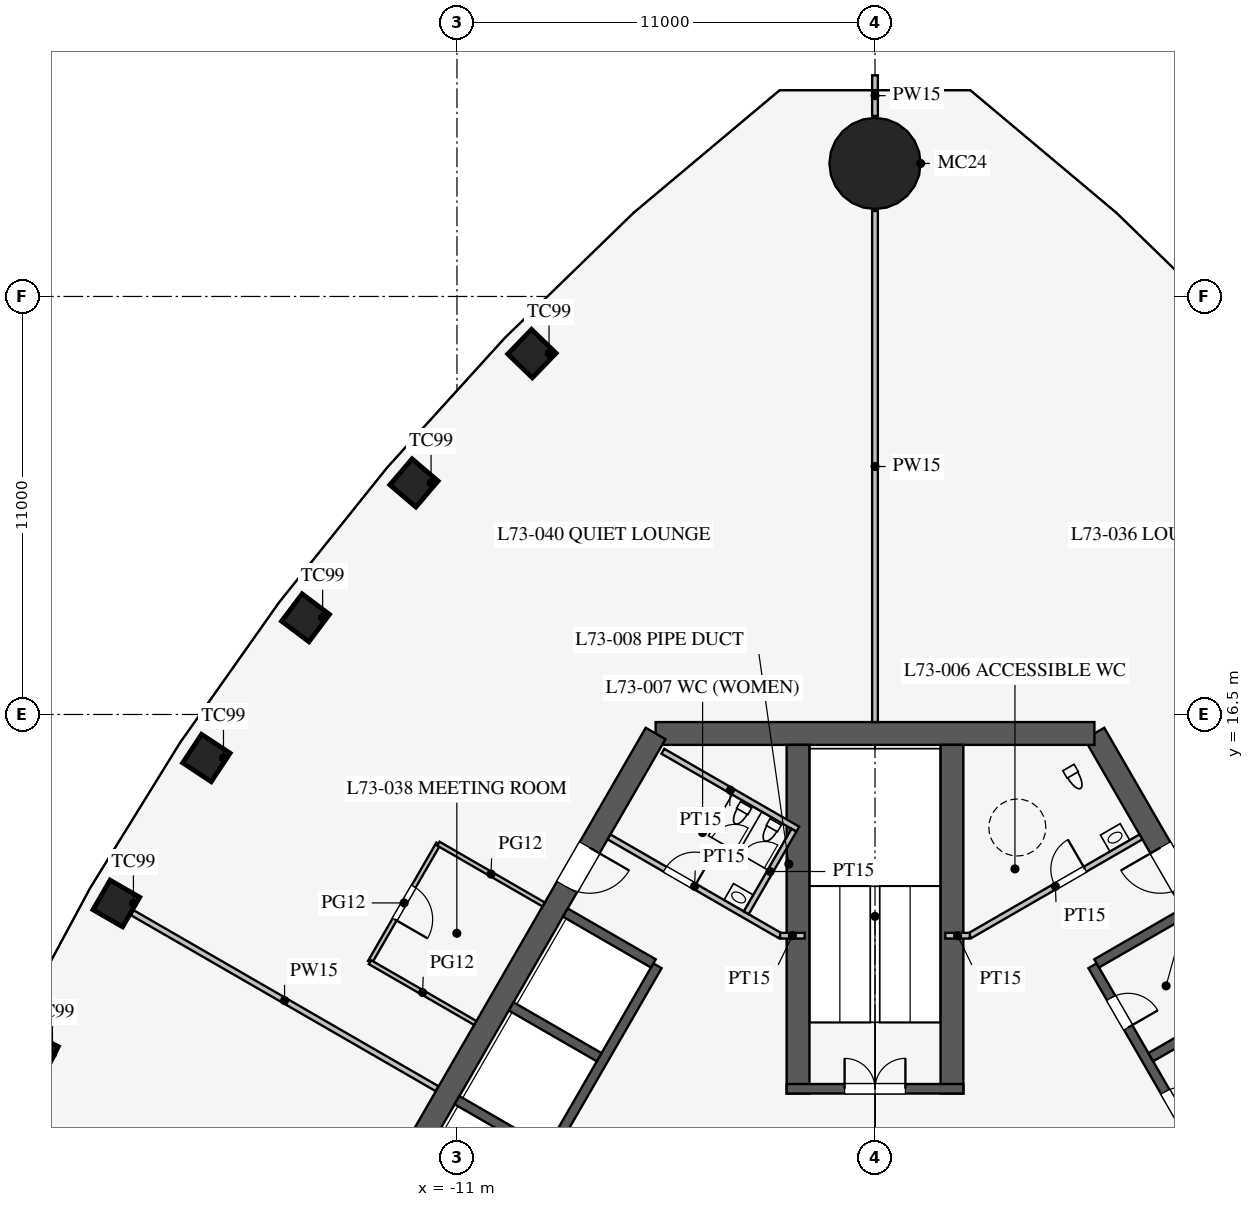
"""IFC4 building model, lengths in metres.
Left out: names, types, materials, properties, quantities, classifications, styles, units other than length and angle.
Written with IfcOpenShell. Run it as: python <this file> out.ifc"""

import sys

from ifc_helpers import new_model, si_unit, direction, frame, frame_2d, origin, origin_2d, place, context, subcontext, project, spatial, rectangle, circle, extrude, element, fill, save


model = new_model("IFC4")
c1 = context("Model", 3, precision=1e-05, world=origin(), true_north=direction((0.0, 1.0)))
c2 = subcontext(c1, "Body", "Model", "MODEL_VIEW")
j1 = project(units=[si_unit("LENGTHUNIT", "METRE"), si_unit("PLANEANGLEUNIT", "RADIAN")], contexts=[c1])
p1 = place(None, origin())
s1 = spatial("IfcSite", under=j1, at=p1, CompositionType="ELEMENT")
p2 = place(p1, origin())
s2 = spatial("IfcBuilding", under=s1, at=p2, CompositionType="ELEMENT")
p3 = place(p2, frame((0.0, 0.0, 318.3)))
s3 = spatial("IfcBuildingStorey", under=s2, at=p3, CompositionType="ELEMENT", Elevation=318.3)
for number, where, z_axis, x_axis in (
    (1, (-9.027, 25.997, 0.0), (0.0, 0.0, 1.0), (-0.695, -0.719, 0.0)),
    (2, (-12.132, 22.593, 0.0), (0.0, 0.0, 1.0), (-0.649, -0.761, 0.0)),
    (3, (-14.985, 19.044, 0.0), (0.0, 0.0, 1.0), (-0.601, -0.799, 0.0)),
    (4, (-17.594, 15.354, 0.0), (0.0, 0.0, 1.0), (-0.552, -0.834, 0.0)),
    (5, (-19.963, 11.526, 0.0), (0.0, 0.0, 1.0), (-0.5, -0.866, 0.0)),
    (6, (-22.094, 7.56, 0.0), (0.0, 0.0, 1.0), (-0.447, -0.895, 0.0)),
):
    element("IfcColumn", number, at=place(p3, frame(where, z_axis=z_axis, x_axis=x_axis)), inside=s3, PredefinedType="COLUMN", context=c2, shape_type="SweptSolid", body=[
        extrude(rectangle(XDim=0.9, YDim=0.9, at=origin_2d()), origin(), (0.0, 0.0, 1.0), 4.2),
    ])
p4 = place(p3, frame((0.0, 31.0, 0.0), z_axis=(0.0, 0.0, 1.0), x_axis=(1.0, 0.0, 0.0)))
e7 = element("IfcColumn", 7, at=p4, inside=s3, PredefinedType="COLUMN", context=c2, shape_type="SweptSolid", body=[
    extrude(circle(Radius=1.2, at=origin_2d()), origin(), (0.0, 0.0, 1.0), 4.2),
])
p5 = place(p3, frame((16.743, -3.0, 0.0), z_axis=(0.0, 0.0, 1.0), x_axis=(-0.500002442456, 0.866023993627, 0.0)))
e8 = element("IfcWall", 8, at=p5, inside=s3, PredefinedType="SHEAR", context=c2, shape_type="SweptSolid", body=[
    extrude(rectangle(XDim=21.939, YDim=0.6, at=frame_2d((10.97, 0.0))), origin(), (0.0, 0.0, 1.0), 4.2),
])
p6 = place(p5, frame((17.27, 0.0, 0.0)))
e9 = element("IfcOpeningElement", 9, at=p6, cuts=e8, PredefinedType="OPENING", context=c2, shape_type="SweptSolid", body=[
    extrude(rectangle(XDim=1.2, YDim=2.1, at=frame_2d((0.6, 1.05))), frame((0.0, 0.31, 0.0), z_axis=(0.0, -1.0, 0.0), x_axis=(1.0, 0.0, 0.0)), (0.0, 0.0, 1.0), 0.62),
])
p7 = place(p5, frame((3.47, 0.0, 0.0)))
e10 = element("IfcOpeningElement", 10, at=p7, cuts=e8, PredefinedType="OPENING", context=c2, shape_type="SweptSolid", body=[
    extrude(rectangle(XDim=1.2, YDim=2.1, at=frame_2d((0.6, 1.05))), frame((0.0, 0.31, 0.0), z_axis=(0.0, -1.0, 0.0), x_axis=(1.0, 0.0, 0.0)), (0.0, 0.0, 1.0), 0.62),
])
p8 = place(p3, frame((5.773, 16.0, 0.0), z_axis=(0.0, 0.0, 1.0), x_axis=(-1.0, 0.0, 0.0)))
e11 = element("IfcWall", 11, at=p8, inside=s3, PredefinedType="SHEAR", context=c2, shape_type="SweptSolid", body=[
    extrude(rectangle(XDim=11.547, YDim=0.6, at=frame_2d((5.773, 0.0))), origin(), (0.0, 0.0, 1.0), 4.2),
])
p9 = place(p3, frame((-5.773, 16.0, 0.0), z_axis=(0.0, 0.0, 1.0), x_axis=(-0.500002442456, -0.866023993627, 0.0)))
e12 = element("IfcWall", 12, at=p9, inside=s3, PredefinedType="SHEAR", context=c2, shape_type="SweptSolid", body=[
    extrude(rectangle(XDim=21.939, YDim=0.6, at=frame_2d((10.97, 0.0))), origin(), (0.0, 0.0, 1.0), 4.2),
])
p10 = place(p9, frame((17.27, 0.0, 0.0)))
e13 = element("IfcOpeningElement", 13, at=p10, cuts=e12, PredefinedType="OPENING", context=c2, shape_type="SweptSolid", body=[
    extrude(rectangle(XDim=1.2, YDim=2.1, at=frame_2d((0.6, 1.05))), frame((0.0, 0.31, 0.0), z_axis=(0.0, -1.0, 0.0), x_axis=(1.0, 0.0, 0.0)), (0.0, 0.0, 1.0), 0.62),
])
p11 = place(p9, frame((3.47, 0.0, 0.0)))
e14 = element("IfcOpeningElement", 14, at=p11, cuts=e12, PredefinedType="OPENING", context=c2, shape_type="SweptSolid", body=[
    extrude(rectangle(XDim=1.2, YDim=2.1, at=frame_2d((0.6, 1.05))), frame((0.0, 0.31, 0.0), z_axis=(0.0, -1.0, 0.0), x_axis=(1.0, 0.0, 0.0)), (0.0, 0.0, 1.0), 0.62),
])
p12 = place(p3, frame((11.424, 0.014, 0.0), z_axis=(0.0, 0.0, 1.0), x_axis=(-0.500001763848, 0.866024385424, 0.0)))
e15 = element("IfcWall", 15, at=p12, inside=s3, PredefinedType="SHEAR", context=c2, shape_type="SweptSolid", body=[
    extrude(rectangle(XDim=11.4, YDim=0.25, at=frame_2d((5.7, 0.0))), origin(), (0.0, 0.0, 1.0), 4.2),
])
p13 = place(p12, frame((0.975, 0.0, 0.0)))
e16 = element("IfcOpeningElement", 16, at=p13, cuts=e15, PredefinedType="OPENING", context=c2, shape_type="SweptSolid", body=[
    extrude(rectangle(XDim=0.9, YDim=2.1, at=frame_2d((0.45, 1.05))), frame((0.0, 0.135, 0.0), z_axis=(0.0, -1.0, 0.0), x_axis=(1.0, 0.0, 0.0)), (0.0, 0.0, 1.0), 0.27),
])
p14 = place(p12, frame((3.825, 0.0, 0.0)))
e17 = element("IfcOpeningElement", 17, at=p14, cuts=e15, PredefinedType="OPENING", context=c2, shape_type="SweptSolid", body=[
    extrude(rectangle(XDim=0.9, YDim=2.1, at=frame_2d((0.45, 1.05))), frame((0.0, 0.135, 0.0), z_axis=(0.0, -1.0, 0.0), x_axis=(1.0, 0.0, 0.0)), (0.0, 0.0, 1.0), 0.27),
])
p15 = place(p12, frame((6.675, 0.0, 0.0)))
e18 = element("IfcOpeningElement", 18, at=p15, cuts=e15, PredefinedType="OPENING", context=c2, shape_type="SweptSolid", body=[
    extrude(rectangle(XDim=0.9, YDim=2.1, at=frame_2d((0.45, 1.05))), frame((0.0, 0.135, 0.0), z_axis=(0.0, -1.0, 0.0), x_axis=(1.0, 0.0, 0.0)), (0.0, 0.0, 1.0), 0.27),
])
p16 = place(p12, frame((9.525, 0.0, 0.0)))
e19 = element("IfcOpeningElement", 19, at=p16, cuts=e15, PredefinedType="OPENING", context=c2, shape_type="SweptSolid", body=[
    extrude(rectangle(XDim=0.9, YDim=2.1, at=frame_2d((0.45, 1.05))), frame((0.0, 0.135, 0.0), z_axis=(0.0, -1.0, 0.0), x_axis=(1.0, 0.0, 0.0)), (0.0, 0.0, 1.0), 0.27),
])
for number, where, z_axis, x_axis in (
    (20, (7.257, 7.481, 0.0), (0.0, 0.0, 1.0), (0.866, 0.5, 0.0)),
    (21, (5.832, 9.949, 0.0), (0.0, 0.0, 1.0), (0.866, 0.5, 0.0)),
):
    element("IfcWall", number, at=place(p3, frame(where, z_axis=z_axis, x_axis=x_axis)), inside=s3, PredefinedType="SHEAR", context=c2, shape_type="SweptSolid", body=[
        extrude(rectangle(XDim=2.675, YDim=0.25, at=frame_2d((1.337, 0.0))), origin(), (0.0, 0.0, 1.0), 4.2),
    ])
p17 = place(p3, frame((-5.724, 9.886, 0.0), z_axis=(0.0, 0.0, 1.0), x_axis=(-0.500001763848, -0.866024385424, 0.0)))
e22 = element("IfcWall", 22, at=p17, inside=s3, PredefinedType="SHEAR", context=c2, shape_type="SweptSolid", body=[
    extrude(rectangle(XDim=11.4, YDim=0.25, at=frame_2d((5.7, 0.0))), origin(), (0.0, 0.0, 1.0), 4.2),
])
p18 = place(p17, frame((6.525, 0.0, 0.0)))
e23 = element("IfcOpeningElement", 23, at=p18, cuts=e22, PredefinedType="OPENING", context=c2, shape_type="SweptSolid", body=[
    extrude(rectangle(XDim=1.2, YDim=2.2, at=frame_2d((0.6, 1.1))), frame((0.0, 0.135, 0.0), z_axis=(0.0, -1.0, 0.0), x_axis=(1.0, 0.0, 0.0)), (0.0, 0.0, 1.0), 0.27),
])
p19 = place(p17, frame((9.375, 0.0, 0.0)))
e24 = element("IfcOpeningElement", 24, at=p19, cuts=e22, PredefinedType="OPENING", context=c2, shape_type="SweptSolid", body=[
    extrude(rectangle(XDim=1.2, YDim=2.2, at=frame_2d((0.6, 1.1))), frame((0.0, 0.135, 0.0), z_axis=(0.0, -1.0, 0.0), x_axis=(1.0, 0.0, 0.0)), (0.0, 0.0, 1.0), 0.27),
])
for number, where, z_axis, x_axis in (
    (25, (-5.832, 9.949, 0.0), (0.0, 0.0, 1.0), (-0.866, 0.5, 0.0)),
    (26, (-7.257, 7.481, 0.0), (0.0, 0.0, 1.0), (-0.866, 0.5, 0.0)),
    (27, (-8.682, 5.012, 0.0), (0.0, 0.0, 1.0), (-0.866, 0.5, 0.0)),
):
    element("IfcWall", number, at=place(p3, frame(where, z_axis=z_axis, x_axis=x_axis)), inside=s3, PredefinedType="SHEAR", context=c2, shape_type="SweptSolid", body=[
        extrude(rectangle(XDim=2.675, YDim=0.25, at=frame_2d((1.337, 0.0))), origin(), (0.0, 0.0, 1.0), 4.2),
    ])
for number, where, z_axis, x_axis in (
    (28, (2.025, 6.525, 0.0), (0.0, 0.0, 1.0), (0.0, 1.0, 0.0)),
    (29, (-2.025, 6.525, 0.0), (0.0, 0.0, 1.0), (0.0, 1.0, 0.0)),
):
    element("IfcWall", number, at=place(p3, frame(where, z_axis=z_axis, x_axis=x_axis)), inside=s3, PredefinedType="SHEAR", context=c2, shape_type="SweptSolid", body=[
        extrude(rectangle(XDim=9.175, YDim=0.6, at=frame_2d((4.587, 0.0))), origin(), (0.0, 0.0, 1.0), 4.2),
    ])
p20 = place(p3, frame((2.325, 6.65, 0.0), z_axis=(0.0, 0.0, 1.0), x_axis=(-1.0, 0.0, 0.0)))
e30 = element("IfcWall", 30, at=p20, inside=s3, PredefinedType="SHEAR", context=c2, shape_type="SweptSolid", body=[
    extrude(rectangle(XDim=4.65, YDim=0.25, at=frame_2d((2.325, 0.0))), origin(), (0.0, 0.0, 1.0), 4.2),
])
p21 = place(p20, frame((1.525, 0.0, 0.0)))
e31 = element("IfcOpeningElement", 31, at=p21, cuts=e30, PredefinedType="OPENING", context=c2, shape_type="SweptSolid", body=[
    extrude(rectangle(XDim=1.6, YDim=2.1, at=frame_2d((0.8, 1.05))), frame((0.0, 0.135, 0.0), z_axis=(0.0, -1.0, 0.0), x_axis=(1.0, 0.0, 0.0)), (0.0, 0.0, 1.0), 0.27),
])
p22 = place(p3, frame((2.495, 10.678, 0.0), z_axis=(0.0, 0.0, 1.0), x_axis=(0.866021400173, 0.500006934395, 0.0)))
e32 = element("IfcWall", 32, at=p22, inside=s3, PredefinedType="PARTITIONING", context=c2, shape_type="SweptSolid", body=[
    extrude(rectangle(XDim=5.2, YDim=0.15, at=frame_2d((2.6, 0.0))), origin(), (0.0, 0.0, 1.0), 4.0),
])
p23 = place(p22, frame((2.6, 0.0, 0.0)))
e33 = element("IfcOpeningElement", 33, at=p23, cuts=e32, PredefinedType="OPENING", context=c2, shape_type="SweptSolid", body=[
    extrude(rectangle(XDim=0.9, YDim=2.1, at=frame_2d((0.45, 1.05))), frame((0.0, 0.085, 0.0), z_axis=(0.0, -1.0, 0.0), x_axis=(1.0, 0.0, 0.0)), (0.0, 0.0, 1.0), 0.17),
])
p24 = place(p3, frame((-2.495, 10.678, 0.0), z_axis=(0.0, 0.0, 1.0), x_axis=(-0.866021400173, 0.500006934395, 0.0)))
e34 = element("IfcWall", 34, at=p24, inside=s3, PredefinedType="PARTITIONING", context=c2, shape_type="SweptSolid", body=[
    extrude(rectangle(XDim=5.2, YDim=0.15, at=frame_2d((2.6, 0.0))), origin(), (0.0, 0.0, 1.0), 4.0),
])
p25 = place(p24, frame((2.6, 0.0, 0.0)))
e35 = element("IfcOpeningElement", 35, at=p25, cuts=e34, PredefinedType="OPENING", context=c2, shape_type="SweptSolid", body=[
    extrude(rectangle(XDim=0.9, YDim=2.1, at=frame_2d((0.45, 1.05))), frame((0.0, 0.085, 0.0), z_axis=(0.0, -1.0, 0.0), x_axis=(1.0, 0.0, 0.0)), (0.0, 0.0, 1.0), 0.17),
])
for number, where, z_axis, x_axis in (
    (36, (2.495, 10.678, 0.0), (0.0, 0.0, 1.0), (-1.0, 0.0, 0.0)),
    (37, (-2.495, 10.678, 0.0), (0.0, 0.0, 1.0), (1.0, 0.0, 0.0)),
):
    element("IfcWall", number, at=place(p3, frame(where, z_axis=z_axis, x_axis=x_axis)), inside=s3, PredefinedType="PARTITIONING", context=c2, shape_type="SweptSolid", body=[
        extrude(rectangle(XDim=0.645, YDim=0.15, at=frame_2d((0.323, 0.0))), origin(), (0.0, 0.0, 1.0), 4.0),
    ])
p26 = place(p3, frame((-2.031, 13.482, 0.0), z_axis=(0.0, 0.0, 1.0), x_axis=(-0.866050731258, 0.499956128963, 0.0)))
e38 = element("IfcWall", 38, at=p26, inside=s3, PredefinedType="PARTITIONING", context=c2, shape_type="SweptSolid", body=[
    extrude(rectangle(XDim=4.1, YDim=0.15, at=frame_2d((2.05, 0.0))), origin(), (0.0, 0.0, 1.0), 4.0),
])
p27 = place(p3, frame((-3.389, 11.281, 0.0), z_axis=(0.0, 0.0, 1.0), x_axis=(0.499989096993, 0.866031698547, 0.0)))
e39 = element("IfcWall", 39, at=p27, inside=s3, PredefinedType="PARTITIONING", context=c2, shape_type="SweptSolid", body=[
    extrude(rectangle(XDim=2.51, YDim=0.15, at=frame_2d((1.255, 0.0))), origin(), (0.0, 0.0, 1.0), 4.0),
])
p28 = place(p3, frame((0.0, 16.3, 0.0), z_axis=(0.0, 0.0, 1.0), x_axis=(0.0, 1.0, 0.0)))
e40 = element("IfcWall", 40, at=p28, inside=s3, PredefinedType="PARTITIONING", context=c2, shape_type="SweptSolid", body=[
    extrude(rectangle(XDim=13.45, YDim=0.15, at=frame_2d((6.725, 0.0))), origin(), (0.0, 0.0, 1.0), 2.0),
])
p29 = place(p3, frame((0.0, 32.25, 0.0), z_axis=(0.0, 0.0, 1.0), x_axis=(0.0, 1.0, 0.0)))
e41 = element("IfcWall", 41, at=p29, inside=s3, PredefinedType="PARTITIONING", context=c2, shape_type="SweptSolid", body=[
    extrude(rectangle(XDim=1.07, YDim=0.15, at=frame_2d((0.535, 0.0))), origin(), (0.0, 0.0, 1.0), 2.0),
])
p30 = place(p3, frame((-11.527, 6.655, 0.0), z_axis=(0.0, 0.0, 1.0), x_axis=(-0.866021846952, 0.500006160563, 0.0)))
e42 = element("IfcWall", 42, at=p30, inside=s3, PredefinedType="PARTITIONING", context=c2, shape_type="SweptSolid", body=[
    extrude(rectangle(XDim=9.262, YDim=0.15, at=frame_2d((4.631, 0.0))), origin(), (0.0, 0.0, 1.0), 3.3),
])
p31 = place(p3, frame((-11.49, 13.1, 0.0), z_axis=(0.0, 0.0, 1.0), x_axis=(-0.499931829785, -0.866064758299, 0.0)))
e43 = element("IfcWall", 43, at=p31, inside=s3, PredefinedType="PARTITIONING", context=c2, shape_type="SweptSolid", body=[
    extrude(rectangle(XDim=3.6, YDim=0.12, at=frame_2d((1.8, 0.0))), origin(), (0.0, 0.0, 1.0), 2.9),
])
p32 = place(p31, frame((1.3, 0.0, 0.15)))
e44 = element("IfcOpeningElement", 44, at=p32, cuts=e43, PredefinedType="OPENING", context=c2, shape_type="SweptSolid", body=[
    extrude(rectangle(XDim=1.0, YDim=2.1, at=frame_2d((0.5, 1.05))), frame((0.0, 0.07, 0.0), z_axis=(0.0, -1.0, 0.0), x_axis=(1.0, 0.0, 0.0)), (0.0, 0.0, 1.0), 0.14),
])
p33 = place(p3, frame((-10.518, 8.382, 0.0), z_axis=(0.0, 0.0, 1.0), x_axis=(-0.866042017984, 0.499971222258, 0.0)))
e45 = element("IfcWall", 45, at=p33, inside=s3, PredefinedType="PARTITIONING", context=c2, shape_type="SweptSolid", body=[
    extrude(rectangle(XDim=3.2, YDim=0.12, at=frame_2d((1.6, 0.0))), origin(), (0.0, 0.0, 1.0), 2.9),
])
p34 = place(p3, frame((-8.718, 11.5, 0.0), z_axis=(0.0, 0.0, 1.0), x_axis=(-0.866028054938, 0.499995408039, 0.0)))
e46 = element("IfcWall", 46, at=p34, inside=s3, PredefinedType="PARTITIONING", context=c2, shape_type="SweptSolid", body=[
    extrude(rectangle(XDim=3.2, YDim=0.12, at=frame_2d((1.6, 0.0))), origin(), (0.0, 0.0, 1.0), 2.9),
])
p35 = place(p23, origin())
e47 = element("IfcDoor", 47, at=p35, inside=s3, OperationType="SINGLE_SWING_RIGHT", PredefinedType="DOOR", context=c2, shape_type="SweptSolid", body=[
    extrude(rectangle(XDim=0.9, YDim=2.1, at=frame_2d((0.45, 1.05))), frame((0.0, 0.025, 0.0), z_axis=(0.0, -1.0, 0.0), x_axis=(1.0, 0.0, 0.0)), (0.0, 0.0, 1.0), 0.05),
])
fill(e33, e47)
p36 = place(p25, frame((0.9, 0.0, 0.0), z_axis=(0.0, 0.0, 1.0), x_axis=(-1.0, 0.0, 0.0)))
e48 = element("IfcDoor", 48, at=p36, inside=s3, OperationType="SINGLE_SWING_RIGHT", PredefinedType="DOOR", context=c2, shape_type="SweptSolid", body=[
    extrude(rectangle(XDim=0.9, YDim=2.1, at=frame_2d((0.45, 1.05))), frame((0.0, 0.025, 0.0), z_axis=(0.0, -1.0, 0.0), x_axis=(1.0, 0.0, 0.0)), (0.0, 0.0, 1.0), 0.05),
])
fill(e35, e48)
p37 = place(p21, frame((1.6, 0.0, 0.0), z_axis=(0.0, 0.0, 1.0), x_axis=(-1.0, 0.0, 0.0)))
e49 = element("IfcDoor", 49, at=p37, inside=s3, OperationType="DOUBLE_DOOR_SINGLE_SWING", PredefinedType="DOOR", context=c2, shape_type="SweptSolid", body=[
    extrude(rectangle(XDim=1.6, YDim=2.1, at=frame_2d((0.8, 1.05))), frame((0.0, 0.025, 0.0), z_axis=(0.0, -1.0, 0.0), x_axis=(1.0, 0.0, 0.0)), (0.0, 0.0, 1.0), 0.05),
])
fill(e31, e49)
p38 = place(p6, origin())
e50 = element("IfcDoor", 50, at=p38, inside=s3, OperationType="SINGLE_SWING_RIGHT", PredefinedType="DOOR", context=c2, shape_type="SweptSolid", body=[
    extrude(rectangle(XDim=1.2, YDim=2.1, at=frame_2d((0.6, 1.05))), frame((0.0, 0.025, 0.0), z_axis=(0.0, -1.0, 0.0), x_axis=(1.0, 0.0, 0.0)), (0.0, 0.0, 1.0), 0.05),
])
fill(e9, e50)
p39 = place(p11, origin())
e51 = element("IfcDoor", 51, at=p39, inside=s3, OperationType="SINGLE_SWING_LEFT", PredefinedType="DOOR", context=c2, shape_type="SweptSolid", body=[
    extrude(rectangle(XDim=1.2, YDim=2.1, at=frame_2d((0.6, 1.05))), frame((0.0, 0.025, 0.0), z_axis=(0.0, -1.0, 0.0), x_axis=(1.0, 0.0, 0.0)), (0.0, 0.0, 1.0), 0.05),
])
fill(e14, e51)
p40 = place(p15, frame((0.9, 0.0, 0.0), z_axis=(0.0, 0.0, 1.0), x_axis=(-1.0, 0.0, 0.0)))
e52 = element("IfcDoor", 52, at=p40, inside=s3, OperationType="SINGLE_SWING_RIGHT", PredefinedType="DOOR", context=c2, shape_type="SweptSolid", body=[
    extrude(rectangle(XDim=0.9, YDim=2.1, at=frame_2d((0.45, 1.05))), frame((0.0, 0.025, 0.0), z_axis=(0.0, -1.0, 0.0), x_axis=(1.0, 0.0, 0.0)), (0.0, 0.0, 1.0), 0.05),
])
fill(e18, e52)
p41 = place(p16, frame((0.9, 0.0, 0.0), z_axis=(0.0, 0.0, 1.0), x_axis=(-1.0, 0.0, 0.0)))
e53 = element("IfcDoor", 53, at=p41, inside=s3, OperationType="SINGLE_SWING_RIGHT", PredefinedType="DOOR", context=c2, shape_type="SweptSolid", body=[
    extrude(rectangle(XDim=0.9, YDim=2.1, at=frame_2d((0.45, 1.05))), frame((0.0, 0.025, 0.0), z_axis=(0.0, -1.0, 0.0), x_axis=(1.0, 0.0, 0.0)), (0.0, 0.0, 1.0), 0.05),
])
fill(e19, e53)
p42 = place(p32, origin())
e54 = element("IfcDoor", 54, at=p42, inside=s3, OperationType="SINGLE_SWING_RIGHT", PredefinedType="DOOR", context=c2, shape_type="SweptSolid", body=[
    extrude(rectangle(XDim=1.0, YDim=2.1, at=frame_2d((0.5, 1.05))), frame((0.0, 0.025, 0.0), z_axis=(0.0, -1.0, 0.0), x_axis=(1.0, 0.0, 0.0)), (0.0, 0.0, 1.0), 0.05),
])
fill(e44, e54)
save(model, sys.argv[1])
